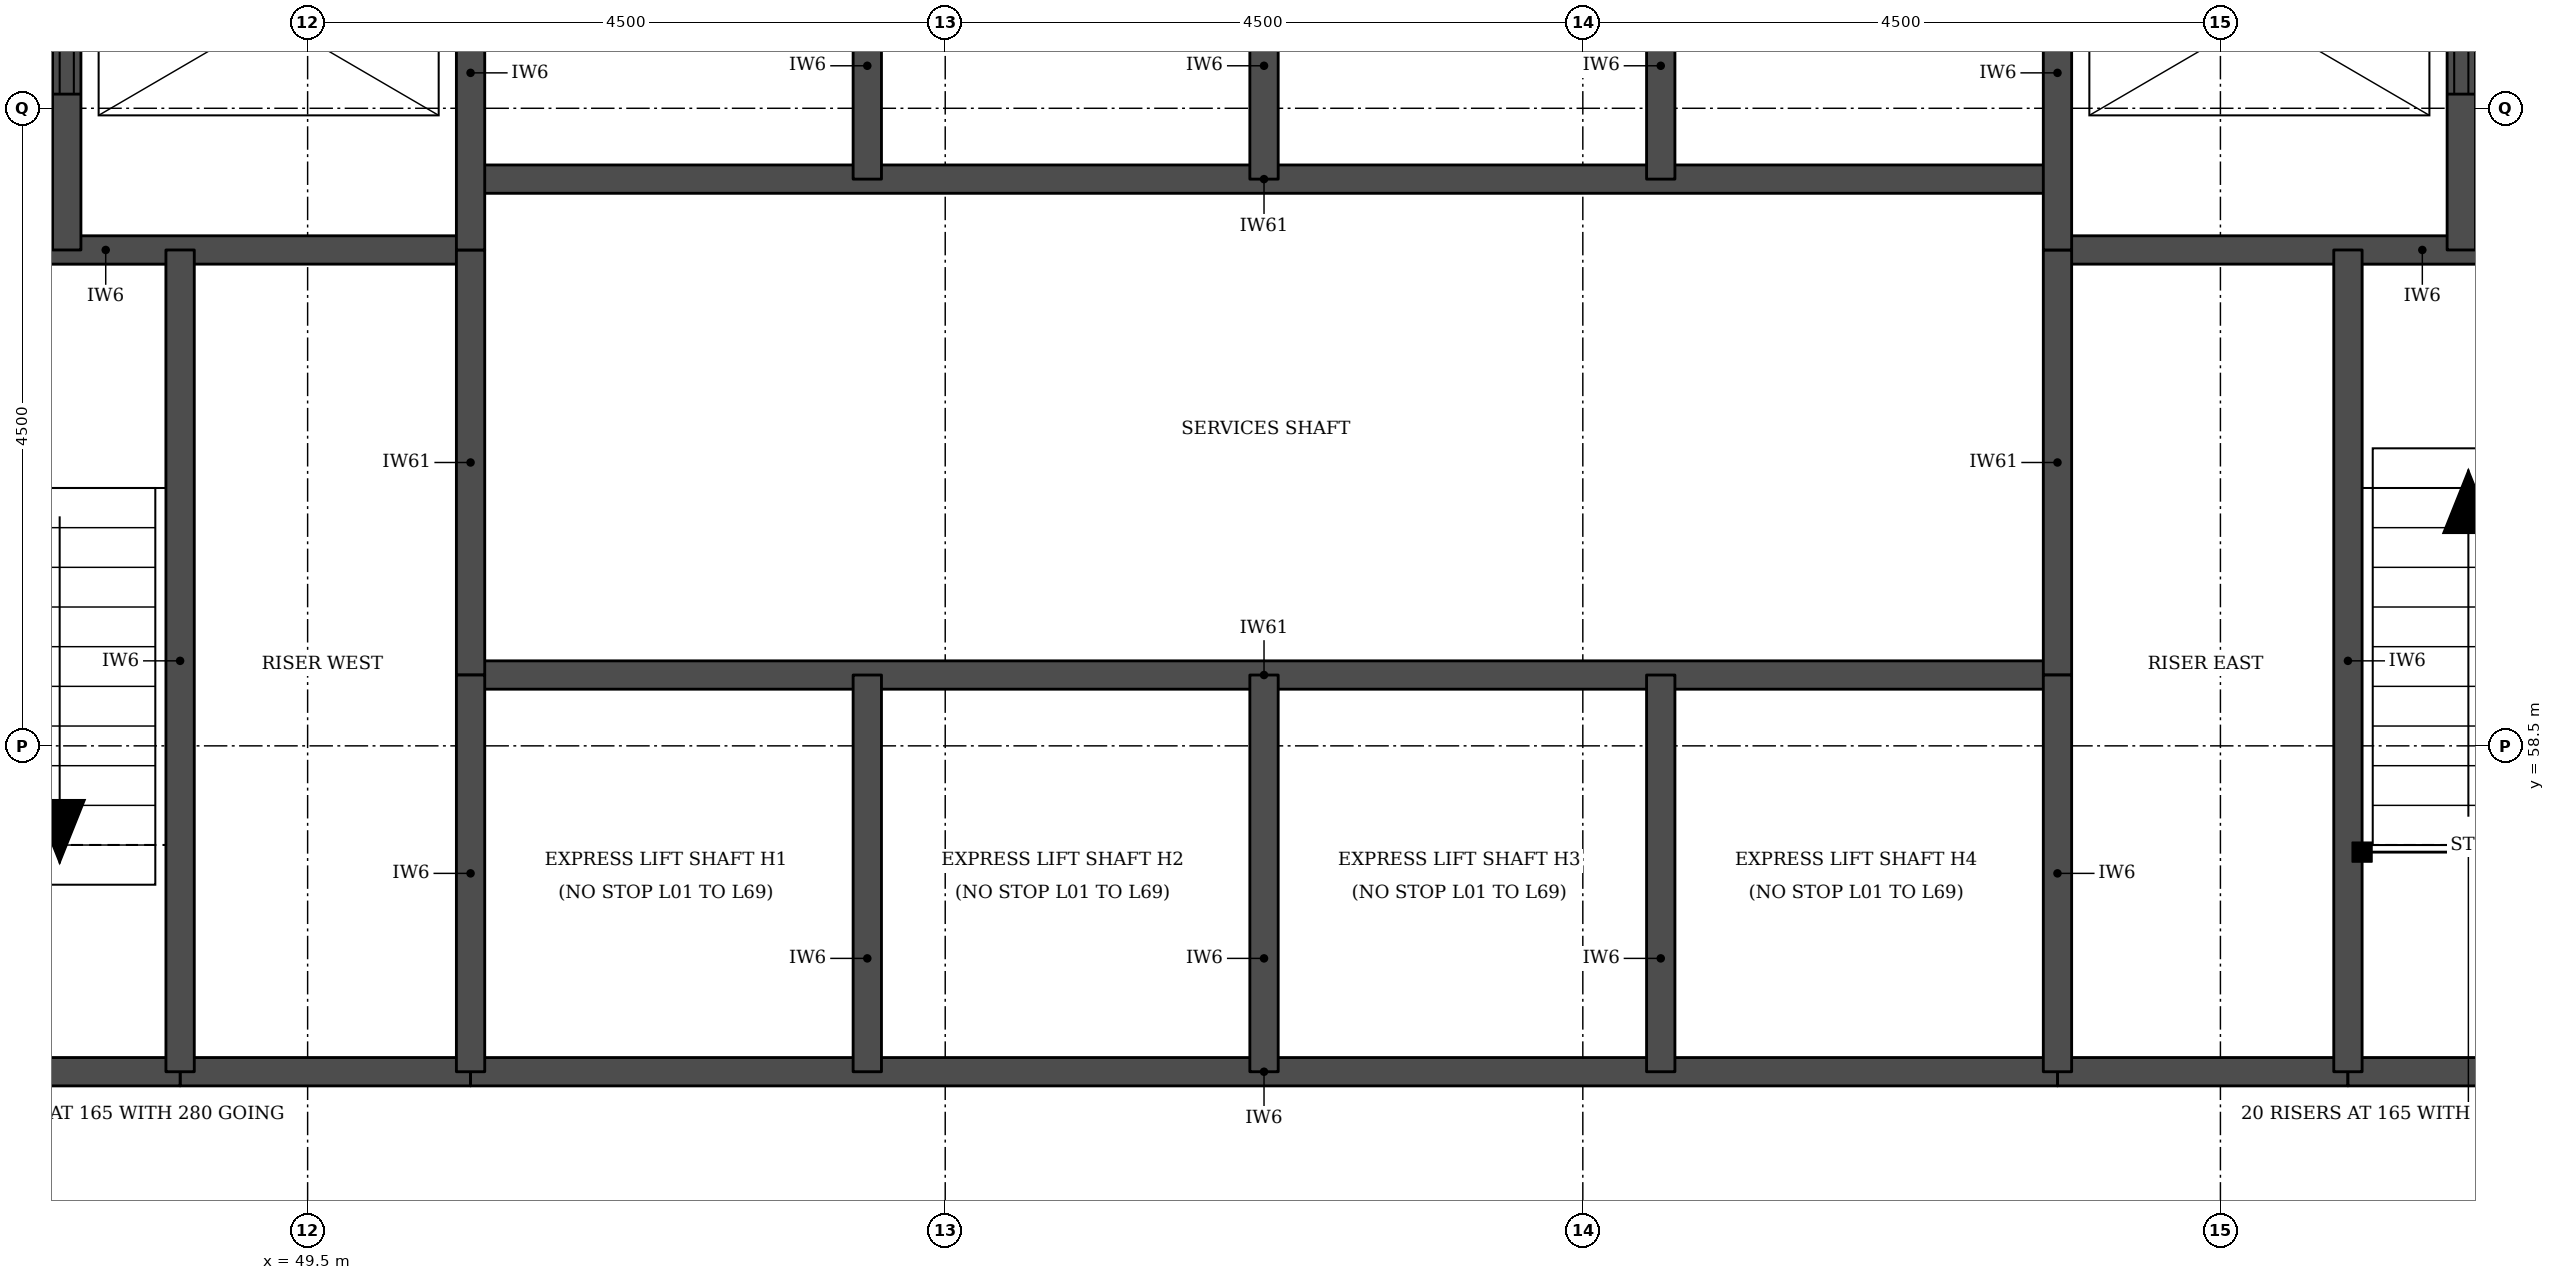
"""IFC4 building model, lengths in metres.
Left out: names, types, materials, properties, quantities, classifications, styles, units other than length and angle.
Written with IfcOpenShell. Run it as: python <this file> out.ifc"""

import sys

from ifc_helpers import new_model, si_unit, direction, frame, frame_2d, origin, place, context, subcontext, project, spatial, rectangle, extrude, element, fill, save


model = new_model("IFC4")
c1 = context("Model", 3, precision=1e-05, world=origin(), true_north=direction((0.0, 1.0)))
c2 = subcontext(c1, "Body", "Model", "MODEL_VIEW")
j1 = project(units=[si_unit("LENGTHUNIT", "METRE"), si_unit("PLANEANGLEUNIT", "RADIAN")], contexts=[c1])
p1 = place(None, origin())
s1 = spatial("IfcSite", under=j1, at=p1, CompositionType="ELEMENT")
p2 = place(p1, origin())
s2 = spatial("IfcBuilding", under=s1, at=p2, CompositionType="ELEMENT")
p3 = place(p2, frame((0.0, 0.0, 29.7)))
s3 = spatial("IfcBuildingStorey", under=s2, at=p3, CompositionType="ELEMENT", Elevation=29.7)
for number, where, z_axis, x_axis in (
    (1, (48.6, 56.2, 0.0), (0.0, 0.0, 1.0), (1.0, 0.0, 0.0)),
    (2, (61.85, 56.2, 0.0), (0.0, 0.0, 1.0), (1.0, 0.0, 0.0)),
):
    element("IfcWall", number, at=place(p3, frame(where, z_axis=z_axis, x_axis=x_axis)), inside=s3, PredefinedType="SOLIDWALL", context=c2, shape_type="SweptSolid", body=[
        extrude(rectangle(XDim=2.05, YDim=0.2, at=frame_2d((1.025, 0.0))), origin(), (0.0, 0.0, 1.0), 3.08),
    ])
p4 = place(p3, frame((45.5, 56.2, 0.0), z_axis=(0.0, 0.0, 1.0), x_axis=(1.0, 0.0, 0.0)))
e3 = element("IfcWall", 3, at=p4, inside=s3, PredefinedType="SOLIDWALL", context=c2, shape_type="SweptSolid", body=[
    extrude(rectangle(XDim=3.1, YDim=0.2, at=frame_2d((1.55, 0.0))), origin(), (0.0, 0.0, 1.0), 3.08),
])
p5 = place(p3, frame((50.65, 56.2, 0.0), z_axis=(0.0, 0.0, 1.0), x_axis=(1.0, 0.0, 0.0)))
e4 = element("IfcWall", 4, at=p5, inside=s3, PredefinedType="SOLIDWALL", context=c2, shape_type="SweptSolid", body=[
    extrude(rectangle(XDim=11.2, YDim=0.2, at=frame_2d((5.6, 0.0))), origin(), (0.0, 0.0, 1.0), 3.08),
])
p6 = place(p3, frame((63.9, 56.2, 0.0), z_axis=(0.0, 0.0, 1.0), x_axis=(1.0, 0.0, 0.0)))
e5 = element("IfcWall", 5, at=p6, inside=s3, PredefinedType="SOLIDWALL", context=c2, shape_type="SweptSolid", body=[
    extrude(rectangle(XDim=3.1, YDim=0.2, at=frame_2d((1.55, 0.0))), origin(), (0.0, 0.0, 1.0), 3.08),
])
p7 = place(p3, frame((50.65, 59.0, 0.0), z_axis=(0.0, 0.0, 1.0), x_axis=(1.0, 0.0, 0.0)))
e6 = element("IfcWall", 6, at=p7, inside=s3, PredefinedType="SOLIDWALL", context=c2, shape_type="SweptSolid", body=[
    extrude(rectangle(XDim=11.2, YDim=0.2, at=frame_2d((5.6, 0.0))), origin(), (0.0, 0.0, 1.0), 3.3),
])
for number, where, z_axis, x_axis in (
    (7, (45.5, 62.0, 0.0), (0.0, 0.0, 1.0), (1.0, 0.0, 0.0)),
    (8, (61.85, 62.0, 0.0), (0.0, 0.0, 1.0), (1.0, 0.0, 0.0)),
):
    element("IfcWall", number, at=place(p3, frame(where, z_axis=z_axis, x_axis=x_axis)), inside=s3, PredefinedType="SOLIDWALL", context=c2, shape_type="SweptSolid", body=[
        extrude(rectangle(XDim=5.15, YDim=0.2, at=frame_2d((2.575, 0.0))), origin(), (0.0, 0.0, 1.0), 3.08),
    ])
p8 = place(p3, frame((50.65, 62.5, 0.0), z_axis=(0.0, 0.0, 1.0), x_axis=(1.0, 0.0, 0.0)))
e9 = element("IfcWall", 9, at=p8, inside=s3, PredefinedType="SOLIDWALL", context=c2, shape_type="SweptSolid", body=[
    extrude(rectangle(XDim=11.2, YDim=0.2, at=frame_2d((5.6, 0.0))), origin(), (0.0, 0.0, 1.0), 3.3),
])
p9 = place(p3, frame((47.8, 62.0, 0.0), z_axis=(0.0, 0.0, 1.0), x_axis=(0.0, 1.0, 0.0)))
e10 = element("IfcWall", 10, at=p9, inside=s3, PredefinedType="SOLIDWALL", context=c2, shape_type="SweptSolid", body=[
    extrude(rectangle(XDim=3.3, YDim=0.2, at=frame_2d((1.65, 0.0))), origin(), (0.0, 0.0, 1.0), 3.08),
])
p10 = place(p9, frame((1.1, 0.0, 0.0)))
e11 = element("IfcOpeningElement", 11, at=p10, cuts=e10, PredefinedType="OPENING", context=c2, shape_type="SweptSolid", body=[
    extrude(rectangle(XDim=1.1, YDim=2.1, at=frame_2d((0.55, 1.05))), frame((0.0, 0.11, 0.0), z_axis=(0.0, -1.0, 0.0), x_axis=(1.0, 0.0, 0.0)), (0.0, 0.0, 1.0), 0.22),
])
p11 = place(p3, frame((48.6, 56.2, 0.0), z_axis=(0.0, 0.0, 1.0), x_axis=(0.0, 1.0, 0.0)))
e12 = element("IfcWall", 12, at=p11, inside=s3, PredefinedType="SOLIDWALL", context=c2, shape_type="SweptSolid", body=[
    extrude(rectangle(XDim=5.8, YDim=0.2, at=frame_2d((2.9, 0.0))), origin(), (0.0, 0.0, 1.0), 3.08),
])
p12 = place(p3, frame((50.65, 59.0, 0.0), z_axis=(0.0, 0.0, 1.0), x_axis=(0.0, 1.0, 0.0)))
e13 = element("IfcWall", 13, at=p12, inside=s3, PredefinedType="SOLIDWALL", context=c2, shape_type="SweptSolid", body=[
    extrude(rectangle(XDim=3.0, YDim=0.2, at=frame_2d((1.5, 0.0))), origin(), (0.0, 0.0, 1.0), 3.3),
])
p13 = place(p3, frame((50.65, 56.2, 0.0), z_axis=(0.0, 0.0, 1.0), x_axis=(0.0, 1.0, 0.0)))
e14 = element("IfcWall", 14, at=p13, inside=s3, PredefinedType="SOLIDWALL", context=c2, shape_type="SweptSolid", body=[
    extrude(rectangle(XDim=2.8, YDim=0.2, at=frame_2d((1.4, 0.0))), origin(), (0.0, 0.0, 1.0), 3.08),
])
p14 = place(p3, frame((50.65, 62.0, 0.0), z_axis=(0.0, 0.0, 1.0), x_axis=(0.0, 1.0, 0.0)))
e15 = element("IfcWall", 15, at=p14, inside=s3, PredefinedType="SOLIDWALL", context=c2, shape_type="SweptSolid", body=[
    extrude(rectangle(XDim=3.3, YDim=0.2, at=frame_2d((1.65, 0.0))), origin(), (0.0, 0.0, 1.0), 3.08),
])
for number, where, z_axis, x_axis in (
    (16, (53.45, 56.2, 0.0), (0.0, 0.0, 1.0), (0.0, 1.0, 0.0)),
    (17, (53.45, 62.5, 0.0), (0.0, 0.0, 1.0), (0.0, 1.0, 0.0)),
    (18, (56.25, 56.2, 0.0), (0.0, 0.0, 1.0), (0.0, 1.0, 0.0)),
    (19, (56.25, 62.5, 0.0), (0.0, 0.0, 1.0), (0.0, 1.0, 0.0)),
    (20, (59.05, 56.2, 0.0), (0.0, 0.0, 1.0), (0.0, 1.0, 0.0)),
    (21, (59.05, 62.5, 0.0), (0.0, 0.0, 1.0), (0.0, 1.0, 0.0)),
):
    element("IfcWall", number, at=place(p3, frame(where, z_axis=z_axis, x_axis=x_axis)), inside=s3, PredefinedType="SOLIDWALL", context=c2, shape_type="SweptSolid", body=[
        extrude(rectangle(XDim=2.8, YDim=0.2, at=frame_2d((1.4, 0.0))), origin(), (0.0, 0.0, 1.0), 3.08),
    ])
p15 = place(p3, frame((61.85, 59.0, 0.0), z_axis=(0.0, 0.0, 1.0), x_axis=(0.0, 1.0, 0.0)))
e22 = element("IfcWall", 22, at=p15, inside=s3, PredefinedType="SOLIDWALL", context=c2, shape_type="SweptSolid", body=[
    extrude(rectangle(XDim=3.0, YDim=0.2, at=frame_2d((1.5, 0.0))), origin(), (0.0, 0.0, 1.0), 3.3),
])
p16 = place(p3, frame((61.85, 56.2, 0.0), z_axis=(0.0, 0.0, 1.0), x_axis=(0.0, 1.0, 0.0)))
e23 = element("IfcWall", 23, at=p16, inside=s3, PredefinedType="SOLIDWALL", context=c2, shape_type="SweptSolid", body=[
    extrude(rectangle(XDim=2.8, YDim=0.2, at=frame_2d((1.4, 0.0))), origin(), (0.0, 0.0, 1.0), 3.08),
])
p17 = place(p3, frame((61.85, 62.0, 0.0), z_axis=(0.0, 0.0, 1.0), x_axis=(0.0, 1.0, 0.0)))
e24 = element("IfcWall", 24, at=p17, inside=s3, PredefinedType="SOLIDWALL", context=c2, shape_type="SweptSolid", body=[
    extrude(rectangle(XDim=3.3, YDim=0.2, at=frame_2d((1.65, 0.0))), origin(), (0.0, 0.0, 1.0), 3.08),
])
p18 = place(p3, frame((63.9, 56.2, 0.0), z_axis=(0.0, 0.0, 1.0), x_axis=(0.0, 1.0, 0.0)))
e25 = element("IfcWall", 25, at=p18, inside=s3, PredefinedType="SOLIDWALL", context=c2, shape_type="SweptSolid", body=[
    extrude(rectangle(XDim=5.8, YDim=0.2, at=frame_2d((2.9, 0.0))), origin(), (0.0, 0.0, 1.0), 3.08),
])
p19 = place(p3, frame((64.7, 62.0, 0.0), z_axis=(0.0, 0.0, 1.0), x_axis=(0.0, 1.0, 0.0)))
e26 = element("IfcWall", 26, at=p19, inside=s3, PredefinedType="SOLIDWALL", context=c2, shape_type="SweptSolid", body=[
    extrude(rectangle(XDim=3.3, YDim=0.2, at=frame_2d((1.65, 0.0))), origin(), (0.0, 0.0, 1.0), 3.08),
])
p20 = place(p19, frame((1.1, 0.0, 0.0)))
e27 = element("IfcOpeningElement", 27, at=p20, cuts=e26, PredefinedType="OPENING", context=c2, shape_type="SweptSolid", body=[
    extrude(rectangle(XDim=1.1, YDim=2.1, at=frame_2d((0.55, 1.05))), frame((0.0, 0.11, 0.0), z_axis=(0.0, -1.0, 0.0), x_axis=(1.0, 0.0, 0.0)), (0.0, 0.0, 1.0), 0.22),
])
p21 = place(p10, origin())
e28 = element("IfcDoor", 28, at=p21, inside=s3, OperationType="DOUBLE_DOOR_SLIDING", PredefinedType="DOOR", context=c2, shape_type="SweptSolid", body=[
    extrude(rectangle(XDim=1.1, YDim=2.1, at=frame_2d((0.55, 1.05))), frame((0.0, 0.025, 0.0), z_axis=(0.0, -1.0, 0.0), x_axis=(1.0, 0.0, 0.0)), (0.0, 0.0, 1.0), 0.05),
])
fill(e11, e28)
p22 = place(p20, origin())
e29 = element("IfcDoor", 29, at=p22, inside=s3, OperationType="DOUBLE_DOOR_SLIDING", PredefinedType="DOOR", context=c2, shape_type="SweptSolid", body=[
    extrude(rectangle(XDim=1.1, YDim=2.1, at=frame_2d((0.55, 1.05))), frame((0.0, 0.025, 0.0), z_axis=(0.0, -1.0, 0.0), x_axis=(1.0, 0.0, 0.0)), (0.0, 0.0, 1.0), 0.05),
])
fill(e27, e29)
save(model, sys.argv[1])
